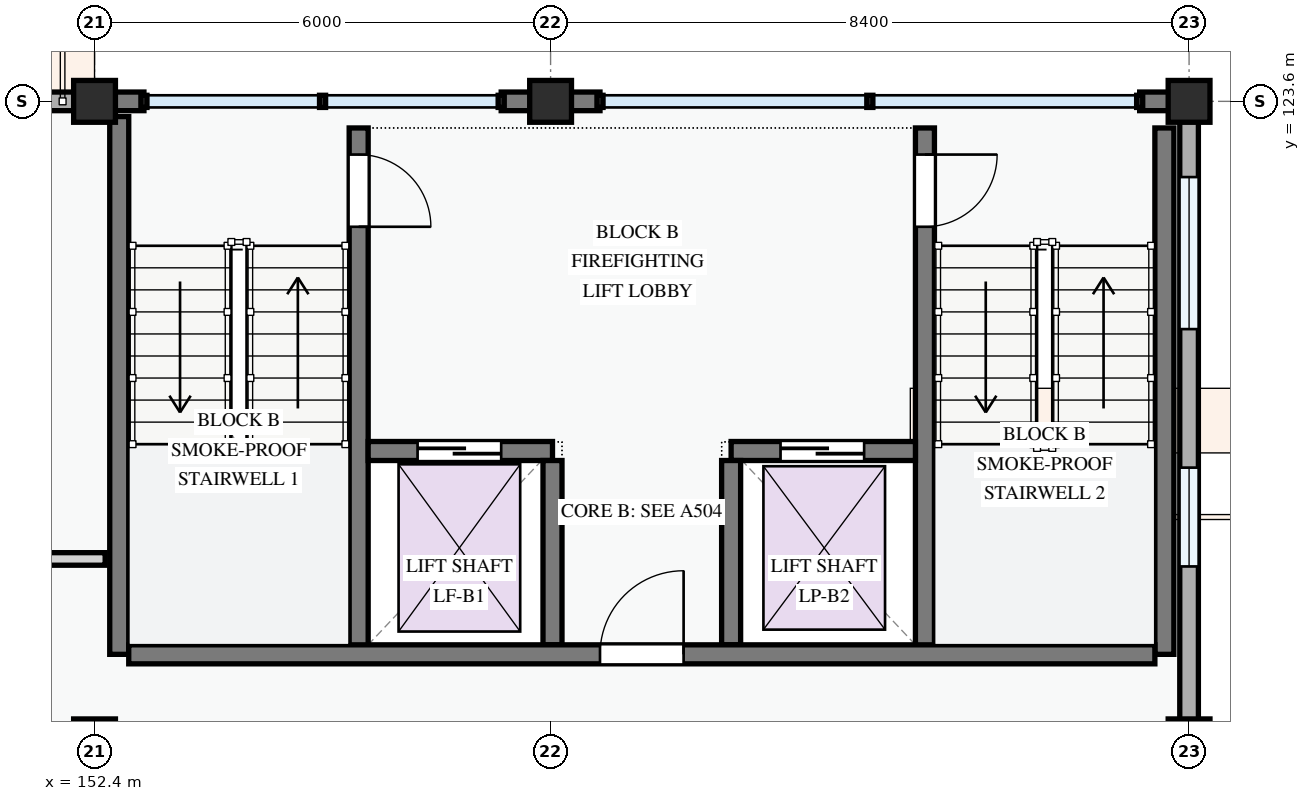
"""IFC4 building model, lengths in metres.
Left out: names, types, materials, properties, quantities, classifications, styles, units other than length and angle.
Written with IfcOpenShell. Run it as: python <this file> out.ifc"""

import sys

from ifc_helpers import new_model, si_unit, direction, frame, frame_2d, origin, origin_2d, place, context, subcontext, project, spatial, rectangle, extrude, element, fill, save


model = new_model("IFC4")
c1 = context("Model", 3, precision=1e-05, world=origin(), true_north=direction((0.0, 1.0)))
c2 = subcontext(c1, "Body", "Model", "MODEL_VIEW")
j1 = project(units=[si_unit("LENGTHUNIT", "METRE"), si_unit("PLANEANGLEUNIT", "RADIAN")], contexts=[c1])
p1 = place(None, origin())
s1 = spatial("IfcSite", under=j1, at=p1, CompositionType="ELEMENT")
p2 = place(p1, origin())
s2 = spatial("IfcBuilding", under=s1, at=p2, CompositionType="ELEMENT")
p3 = place(p2, frame((0.0, 0.0, 37.8)))
s3 = spatial("IfcBuildingStorey", under=s2, at=p3, CompositionType="ELEMENT", Elevation=37.8)
for number, where, z_axis, x_axis in (
    (1, (152.4, 115.2, 0.0), (0.0, 0.0, 1.0), (1.0, 0.0, 0.0)),
    (2, (152.4, 123.6, 0.0), (0.0, 0.0, 1.0), (1.0, 0.0, 0.0)),
    (3, (158.4, 123.6, 0.0), (0.0, 0.0, 1.0), (1.0, 0.0, 0.0)),
    (4, (166.8, 115.2, 0.0), (0.0, 0.0, 1.0), (1.0, 0.0, 0.0)),
    (5, (166.8, 123.6, 0.0), (0.0, 0.0, 1.0), (1.0, 0.0, 0.0)),
):
    element("IfcColumn", number, at=place(p3, frame(where, z_axis=z_axis, x_axis=x_axis)), inside=s3, PredefinedType="COLUMN", context=c2, shape_type="SweptSolid", body=[
        extrude(rectangle(XDim=0.55, YDim=0.55, at=origin_2d()), origin(), (0.0, 0.0, 1.0), 3.3),
    ])
p4 = place(p3, frame((166.8, 115.2, 0.0), z_axis=(0.0, 0.0, 1.0), x_axis=(0.0, 1.0, 0.0)))
e6 = element("IfcWall", 6, at=p4, inside=s3, PredefinedType="STANDARD", context=c2, shape_type="SweptSolid", body=[
    extrude(rectangle(XDim=8.4, YDim=0.245, at=frame_2d((4.2, 0.0))), origin(), (0.0, 0.0, 1.0), 2.425),
])
p5 = place(p4, frame((2.281, 0.0, 0.78)))
e7 = element("IfcOpeningElement", 7, at=p5, cuts=e6, PredefinedType="OPENING", context=c2, shape_type="SweptSolid", body=[
    extrude(rectangle(XDim=1.3, YDim=1.4, at=frame_2d((0.65, 0.7))), frame((0.0, 0.133, 0.0), z_axis=(0.0, -1.0, 0.0), x_axis=(1.0, 0.0, 0.0)), (0.0, 0.0, 1.0), 0.265),
])
p6 = place(p4, frame((5.404, 0.0, 0.78)))
e8 = element("IfcOpeningElement", 8, at=p6, cuts=e6, PredefinedType="OPENING", context=c2, shape_type="SweptSolid", body=[
    extrude(rectangle(XDim=2.0, YDim=1.5, at=frame_2d((1.0, 0.75))), frame((0.0, 0.133, 0.0), z_axis=(0.0, -1.0, 0.0), x_axis=(1.0, 0.0, 0.0)), (0.0, 0.0, 1.0), 0.265),
])
p7 = place(p3, frame((166.676, 123.6, 0.0), z_axis=(0.0, 0.0, 1.0), x_axis=(-1.0, 0.0, 0.0)))
e9 = element("IfcWall", 9, at=p7, inside=s3, PredefinedType="STANDARD", context=c2, shape_type="SweptSolid", body=[
    extrude(rectangle(XDim=0.526, YDim=0.245, at=frame_2d((0.263, 0.0))), origin(), (0.0, 0.0, 1.0), 3.04),
])
p8 = place(p3, frame((159.05, 123.6, 0.0), z_axis=(0.0, 0.0, 1.0), x_axis=(-1.0, 0.0, 0.0)))
e10 = element("IfcWall", 10, at=p8, inside=s3, PredefinedType="STANDARD", context=c2, shape_type="SweptSolid", body=[
    extrude(rectangle(XDim=0.65, YDim=0.245, at=frame_2d((0.325, 0.0))), origin(), (0.0, 0.0, 1.0), 3.04),
])
p9 = place(p3, frame((158.4, 123.6, 0.0), z_axis=(0.0, 0.0, 1.0), x_axis=(-1.0, 0.0, 0.0)))
e11 = element("IfcWall", 11, at=p9, inside=s3, PredefinedType="STANDARD", context=c2, shape_type="SweptSolid", body=[
    extrude(rectangle(XDim=0.65, YDim=0.245, at=frame_2d((0.325, 0.0))), origin(), (0.0, 0.0, 1.0), 3.04),
])
p10 = place(p3, frame((153.05, 123.6, 0.0), z_axis=(0.0, 0.0, 1.0), x_axis=(-1.0, 0.0, 0.0)))
e12 = element("IfcWall", 12, at=p10, inside=s3, PredefinedType="STANDARD", context=c2, shape_type="SweptSolid", body=[
    extrude(rectangle(XDim=0.65, YDim=0.245, at=frame_2d((0.325, 0.0))), origin(), (0.0, 0.0, 1.0), 3.04),
])
p11 = place(p3, frame((152.4, 123.6, 0.0), z_axis=(0.0, 0.0, 1.0), x_axis=(-1.0, 0.0, 0.0)))
e13 = element("IfcWall", 13, at=p11, inside=s3, PredefinedType="STANDARD", context=c2, shape_type="SweptSolid", body=[
    extrude(rectangle(XDim=8.4, YDim=0.245, at=frame_2d((4.2, 0.0))), origin(), (0.0, 0.0, 1.0), 2.375),
])
p12 = place(p11, frame((0.62, 0.0, 0.0)))
e14 = element("IfcOpeningElement", 14, at=p12, cuts=e13, PredefinedType="OPENING", context=c2, shape_type="SweptSolid", body=[
    extrude(rectangle(XDim=1.1, YDim=2.15, at=frame_2d((0.55, 1.075))), frame((0.0, 0.133, 0.0), z_axis=(0.0, -1.0, 0.0), x_axis=(1.0, 0.0, 0.0)), (0.0, 0.0, 1.0), 0.265),
])
p13 = place(p11, frame((2.965, 0.0, 0.78)))
e15 = element("IfcOpeningElement", 15, at=p13, cuts=e13, PredefinedType="OPENING", context=c2, shape_type="SweptSolid", body=[
    extrude(rectangle(XDim=0.9, YDim=1.2, at=frame_2d((0.45, 0.6))), frame((0.0, 0.133, 0.0), z_axis=(0.0, -1.0, 0.0), x_axis=(1.0, 0.0, 0.0)), (0.0, 0.0, 1.0), 0.265),
])
p14 = place(p11, frame((5.69, 0.0, 0.78)))
e16 = element("IfcOpeningElement", 16, at=p14, cuts=e13, PredefinedType="OPENING", context=c2, shape_type="SweptSolid", body=[
    extrude(rectangle(XDim=1.75, YDim=1.45, at=frame_2d((0.875, 0.725))), frame((0.0, 0.133, 0.0), z_axis=(0.0, -1.0, 0.0), x_axis=(1.0, 0.0, 0.0)), (0.0, 0.0, 1.0), 0.265),
])
p15 = place(p3, frame((155.875, 123.25, 0.0), z_axis=(0.0, 0.0, 1.0), x_axis=(0.0, -1.0, 0.0)))
e17 = element("IfcWall", 17, at=p15, inside=s3, PredefinedType="SHEAR", context=c2, shape_type="SweptSolid", body=[
    extrude(rectangle(XDim=6.925, YDim=0.25, at=frame_2d((3.462, 0.0))), origin(), (0.0, 0.0, 1.0), 3.0),
])
p16 = place(p15, frame((0.35, 0.0, 0.0)))
e18 = element("IfcOpeningElement", 18, at=p16, cuts=e17, PredefinedType="OPENING", context=c2, shape_type="SweptSolid", body=[
    extrude(rectangle(XDim=0.95, YDim=2.1, at=frame_2d((0.475, 1.05))), frame((0.0, 0.135, 0.0), z_axis=(0.0, -1.0, 0.0), x_axis=(1.0, 0.0, 0.0)), (0.0, 0.0, 1.0), 0.27),
])
p17 = place(p3, frame((152.725, 123.4, 0.0), z_axis=(0.0, 0.0, 1.0), x_axis=(0.0, -1.0, 0.0)))
e19 = element("IfcWall", 19, at=p17, inside=s3, PredefinedType="SHEAR", context=c2, shape_type="SweptSolid", body=[
    extrude(rectangle(XDim=7.075, YDim=0.25, at=frame_2d((3.538, 0.0))), origin(), (0.0, 0.0, 1.0), 3.0),
])
p18 = place(p3, frame((166.475, 123.25, 0.0), z_axis=(0.0, 0.0, 1.0), x_axis=(0.0, -1.0, 0.0)))
e20 = element("IfcWall", 20, at=p18, inside=s3, PredefinedType="SHEAR", context=c2, shape_type="SweptSolid", body=[
    extrude(rectangle(XDim=6.925, YDim=0.25, at=frame_2d((3.462, 0.0))), origin(), (0.0, 0.0, 1.0), 3.0),
])
p19 = place(p3, frame((163.325, 123.25, 0.0), z_axis=(0.0, 0.0, 1.0), x_axis=(0.0, -1.0, 0.0)))
e21 = element("IfcWall", 21, at=p19, inside=s3, PredefinedType="SHEAR", context=c2, shape_type="SweptSolid", body=[
    extrude(rectangle(XDim=6.925, YDim=0.25, at=frame_2d((3.462, 0.0))), origin(), (0.0, 0.0, 1.0), 3.0),
])
p20 = place(p19, frame((0.35, 0.0, 0.0)))
e22 = element("IfcOpeningElement", 22, at=p20, cuts=e21, PredefinedType="OPENING", context=c2, shape_type="SweptSolid", body=[
    extrude(rectangle(XDim=0.95, YDim=2.1, at=frame_2d((0.475, 1.05))), frame((0.0, 0.135, 0.0), z_axis=(0.0, -1.0, 0.0), x_axis=(1.0, 0.0, 0.0)), (0.0, 0.0, 1.0), 0.27),
])
p21 = place(p3, frame((156.0, 119.0, 0.0), z_axis=(0.0, 0.0, 1.0), x_axis=(1.0, 0.0, 0.0)))
e23 = element("IfcWall", 23, at=p21, inside=s3, PredefinedType="SHEAR", context=c2, shape_type="SweptSolid", body=[
    extrude(rectangle(XDim=2.425, YDim=0.25, at=frame_2d((1.212, 0.0))), origin(), (0.0, 0.0, 1.0), 3.0),
])
p22 = place(p21, frame((0.65, 0.0, 0.0)))
e24 = element("IfcOpeningElement", 24, at=p22, cuts=e23, PredefinedType="OPENING", context=c2, shape_type="SweptSolid", body=[
    extrude(rectangle(XDim=1.1, YDim=2.15, at=frame_2d((0.55, 1.075))), frame((0.0, 0.135, 0.0), z_axis=(0.0, -1.0, 0.0), x_axis=(1.0, 0.0, 0.0)), (0.0, 0.0, 1.0), 0.27),
])
p23 = place(p3, frame((160.775, 119.0, 0.0), z_axis=(0.0, 0.0, 1.0), x_axis=(1.0, 0.0, 0.0)))
e25 = element("IfcWall", 25, at=p23, inside=s3, PredefinedType="SHEAR", context=c2, shape_type="SweptSolid", body=[
    extrude(rectangle(XDim=2.425, YDim=0.25, at=frame_2d((1.212, 0.0))), origin(), (0.0, 0.0, 1.0), 3.0),
])
p24 = place(p23, frame((0.65, 0.0, 0.0)))
e26 = element("IfcOpeningElement", 26, at=p24, cuts=e25, PredefinedType="OPENING", context=c2, shape_type="SweptSolid", body=[
    extrude(rectangle(XDim=1.1, YDim=2.15, at=frame_2d((0.55, 1.075))), frame((0.0, 0.135, 0.0), z_axis=(0.0, -1.0, 0.0), x_axis=(1.0, 0.0, 0.0)), (0.0, 0.0, 1.0), 0.27),
])
for number, where, z_axis, x_axis in (
    (27, (158.425, 118.875, 0.0), (0.0, 0.0, 1.0), (0.0, -1.0, 0.0)),
    (28, (160.775, 118.875, 0.0), (0.0, 0.0, 1.0), (0.0, -1.0, 0.0)),
):
    element("IfcWall", number, at=place(p3, frame(where, z_axis=z_axis, x_axis=x_axis)), inside=s3, PredefinedType="SHEAR", context=c2, shape_type="SweptSolid", body=[
        extrude(rectangle(XDim=2.425, YDim=0.25, at=frame_2d((1.212, 0.0))), origin(), (0.0, 0.0, 1.0), 3.0),
    ])
p25 = place(p3, frame((152.85, 116.325, 0.0), z_axis=(0.0, 0.0, 1.0), x_axis=(1.0, 0.0, 0.0)))
e29 = element("IfcWall", 29, at=p25, inside=s3, PredefinedType="SHEAR", context=c2, shape_type="SweptSolid", body=[
    extrude(rectangle(XDim=13.5, YDim=0.25, at=frame_2d((6.75, 0.0))), origin(), (0.0, 0.0, 1.0), 3.0),
])
p26 = place(p25, frame((6.2, 0.0, 0.0)))
e30 = element("IfcOpeningElement", 30, at=p26, cuts=e29, PredefinedType="OPENING", context=c2, shape_type="SweptSolid", body=[
    extrude(rectangle(XDim=1.1, YDim=2.15, at=frame_2d((0.55, 1.075))), frame((0.0, 0.135, 0.0), z_axis=(0.0, -1.0, 0.0), x_axis=(1.0, 0.0, 0.0)), (0.0, 0.0, 1.0), 0.27),
])
p27 = place(p3, frame((109.324, 117.58, 0.0), z_axis=(0.0, 0.0, 1.0), x_axis=(1.0, 0.0, 0.0)))
e31 = element("IfcWall", 31, at=p27, inside=s3, PredefinedType="PARTITIONING", context=c2, shape_type="SweptSolid", body=[
    extrude(rectangle(XDim=43.216, YDim=0.165, at=frame_2d((21.608, 0.0))), origin(), (0.0, 0.0, 1.0), 3.0),
])
p28 = place(p27, frame((2.339, 0.0, 0.0)))
e32 = element("IfcOpeningElement", 32, at=p28, cuts=e31, PredefinedType="OPENING", context=c2, shape_type="SweptSolid", body=[
    extrude(rectangle(XDim=0.92, YDim=2.1, at=frame_2d((0.46, 1.05))), frame((0.0, 0.093, 0.0), z_axis=(0.0, -1.0, 0.0), x_axis=(1.0, 0.0, 0.0)), (0.0, 0.0, 1.0), 0.185),
])
p29 = place(p27, frame((16.851, 0.0, 0.0)))
e33 = element("IfcOpeningElement", 33, at=p29, cuts=e31, PredefinedType="OPENING", context=c2, shape_type="SweptSolid", body=[
    extrude(rectangle(XDim=0.96, YDim=2.12, at=frame_2d((0.48, 1.06))), frame((0.0, 0.093, 0.0), z_axis=(0.0, -1.0, 0.0), x_axis=(1.0, 0.0, 0.0)), (0.0, 0.0, 1.0), 0.185),
])
p30 = place(p27, frame((31.222, 0.0, 0.0)))
e34 = element("IfcOpeningElement", 34, at=p30, cuts=e31, PredefinedType="OPENING", context=c2, shape_type="SweptSolid", body=[
    extrude(rectangle(XDim=0.92, YDim=2.1, at=frame_2d((0.46, 1.05))), frame((0.0, 0.093, 0.0), z_axis=(0.0, -1.0, 0.0), x_axis=(1.0, 0.0, 0.0)), (0.0, 0.0, 1.0), 0.185),
])
p31 = place(p5, origin())
e35 = element("IfcWindow", 35, at=p31, inside=s3, PartitioningType="SINGLE_PANEL", PredefinedType="WINDOW", context=c2, shape_type="SweptSolid", body=[
    extrude(rectangle(XDim=1.3, YDim=1.4, at=frame_2d((0.65, 0.7))), frame((0.0, 0.03, 0.0), z_axis=(0.0, -1.0, 0.0), x_axis=(1.0, 0.0, 0.0)), (0.0, 0.0, 1.0), 0.06),
])
fill(e7, e35)
p32 = place(p6, origin())
e36 = element("IfcWindow", 36, at=p32, inside=s3, PartitioningType="DOUBLE_PANEL_VERTICAL", PredefinedType="WINDOW", context=c2, shape_type="SweptSolid", body=[
    extrude(rectangle(XDim=2.0, YDim=1.5, at=frame_2d((1.0, 0.75))), frame((0.0, 0.03, 0.0), z_axis=(0.0, -1.0, 0.0), x_axis=(1.0, 0.0, 0.0)), (0.0, 0.0, 1.0), 0.06),
])
fill(e8, e36)
p33 = place(p16, origin())
e37 = element("IfcDoor", 37, at=p33, inside=s3, OperationType="SINGLE_SWING_RIGHT", PredefinedType="DOOR", context=c2, shape_type="SweptSolid", body=[
    extrude(rectangle(XDim=0.95, YDim=2.1, at=frame_2d((0.475, 1.05))), frame((0.0, 0.025, 0.0), z_axis=(0.0, -1.0, 0.0), x_axis=(1.0, 0.0, 0.0)), (0.0, 0.0, 1.0), 0.05),
])
fill(e18, e37)
p34 = place(p20, origin())
e38 = element("IfcDoor", 38, at=p34, inside=s3, OperationType="SINGLE_SWING_LEFT", PredefinedType="DOOR", context=c2, shape_type="SweptSolid", body=[
    extrude(rectangle(XDim=0.95, YDim=2.1, at=frame_2d((0.475, 1.05))), frame((0.0, 0.025, 0.0), z_axis=(0.0, -1.0, 0.0), x_axis=(1.0, 0.0, 0.0)), (0.0, 0.0, 1.0), 0.05),
])
fill(e22, e38)
p35 = place(p22, origin())
e39 = element("IfcDoor", 39, at=p35, inside=s3, OperationType="SLIDING_TO_LEFT", PredefinedType="DOOR", context=c2, shape_type="SweptSolid", body=[
    extrude(rectangle(XDim=1.1, YDim=2.15, at=frame_2d((0.55, 1.075))), frame((0.0, 0.025, 0.0), z_axis=(0.0, -1.0, 0.0), x_axis=(1.0, 0.0, 0.0)), (0.0, 0.0, 1.0), 0.05),
])
fill(e24, e39)
p36 = place(p24, origin())
e40 = element("IfcDoor", 40, at=p36, inside=s3, OperationType="SLIDING_TO_LEFT", PredefinedType="DOOR", context=c2, shape_type="SweptSolid", body=[
    extrude(rectangle(XDim=1.1, YDim=2.15, at=frame_2d((0.55, 1.075))), frame((0.0, 0.025, 0.0), z_axis=(0.0, -1.0, 0.0), x_axis=(1.0, 0.0, 0.0)), (0.0, 0.0, 1.0), 0.05),
])
fill(e26, e40)
p37 = place(p26, origin())
e41 = element("IfcDoor", 41, at=p37, inside=s3, OperationType="SINGLE_SWING_RIGHT", PredefinedType="DOOR", context=c2, shape_type="SweptSolid", body=[
    extrude(rectangle(XDim=1.1, YDim=2.15, at=frame_2d((0.55, 1.075))), frame((0.0, 0.025, 0.0), z_axis=(0.0, -1.0, 0.0), x_axis=(1.0, 0.0, 0.0)), (0.0, 0.0, 1.0), 0.05),
])
fill(e30, e41)
save(model, sys.argv[1])
